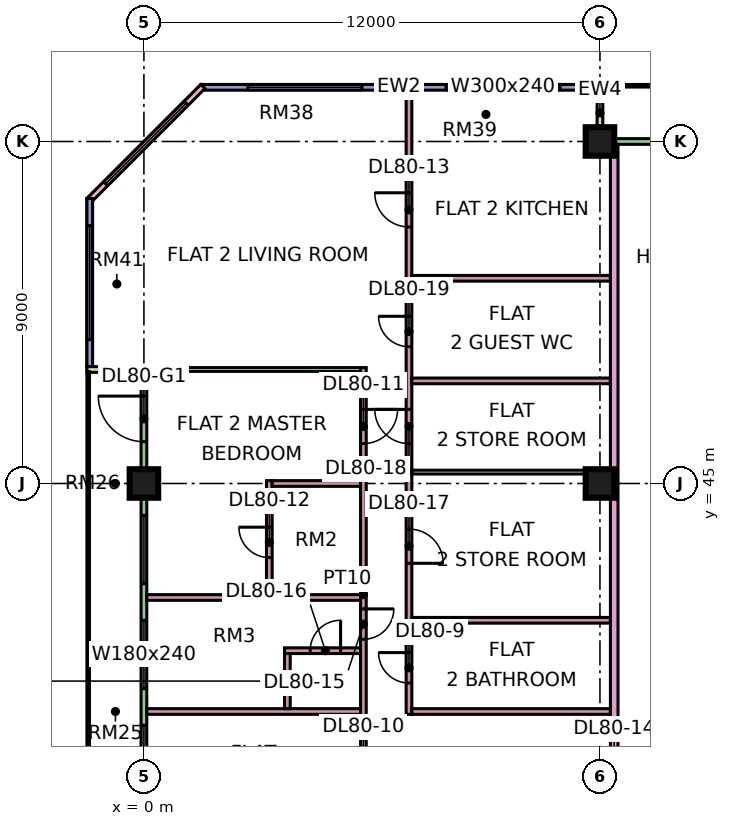
"""IFC4 building model, lengths in metres.
Left out: names, types, materials, properties, quantities, classifications, styles, units other than length and angle.
Written with IfcOpenShell. Run it as: python <this file> out.ifc"""

import sys

from ifc_helpers import new_model, si_unit, direction, frame, frame_2d, origin, origin_2d, place, context, subcontext, project, spatial, rectangle, extrude, element, fill, save


model = new_model("IFC4")
c1 = context("Model", 3, precision=1e-05, world=origin(), true_north=direction((0.0, 1.0)))
c2 = subcontext(c1, "Body", "Model", "MODEL_VIEW")
j1 = project(units=[si_unit("LENGTHUNIT", "METRE"), si_unit("PLANEANGLEUNIT", "RADIAN")], contexts=[c1])
p1 = place(None, origin())
s1 = spatial("IfcSite", under=j1, at=p1, CompositionType="ELEMENT")
p2 = place(p1, origin())
s2 = spatial("IfcBuilding", under=s1, at=p2, CompositionType="ELEMENT")
p3 = place(p2, frame((0.0, 0.0, 346.4)))
s3 = spatial("IfcBuildingStorey", under=s2, at=p3, CompositionType="ELEMENT", Elevation=346.4)
for number, where, z_axis, x_axis in (
    (1, (0.0, 45.0, 0.0), (0.0, 0.0, 1.0), (1.0, 0.0, 0.0)),
    (2, (12.0, 45.0, 0.0), (0.0, 0.0, 1.0), (1.0, 0.0, 0.0)),
    (3, (12.0, 54.0, 0.0), (0.0, 0.0, 1.0), (1.0, 0.0, 0.0)),
):
    element("IfcColumn", number, at=place(p3, frame(where, z_axis=z_axis, x_axis=x_axis)), inside=s3, PredefinedType="COLUMN", context=c2, shape_type="SweptSolid", body=[
        extrude(rectangle(XDim=0.75, YDim=0.75, at=origin_2d()), origin(), (0.0, 0.0, 1.0), 3.75),
    ])
p4 = place(p3, frame((22.425, 54.0, 0.0), z_axis=(0.0, 0.0, 1.0), x_axis=(-1.0, 0.0, 0.0)))
e4 = element("IfcWall", 4, at=p4, inside=s3, PredefinedType="SOLIDWALL", context=c2, shape_type="SweptSolid", body=[
    extrude(rectangle(XDim=10.35, YDim=0.15, at=frame_2d((5.175, 0.0))), origin(), (0.0, 0.0, 1.0), 3.35),
])
p5 = place(p4, frame((1.012, 0.0, 0.45)))
e5 = element("IfcOpeningElement", 5, at=p5, cuts=e4, PredefinedType="OPENING", context=c2, shape_type="SweptSolid", body=[
    extrude(rectangle(XDim=4.8, YDim=2.4, at=frame_2d((2.4, 1.2))), frame((0.0, 0.085, 0.0), z_axis=(0.0, -1.0, 0.0), x_axis=(1.0, 0.0, 0.0)), (0.0, 0.0, 1.0), 0.17),
])
p6 = place(p3, frame((12.0, 55.5, 0.0), z_axis=(0.0, 0.0, 1.0), x_axis=(0.0, -1.0, 0.0)))
e6 = element("IfcWall", 6, at=p6, inside=s3, PredefinedType="SOLIDWALL", context=c2, shape_type="SweptSolid", body=[
    extrude(rectangle(XDim=1.5, YDim=0.15, at=frame_2d((0.75, 0.0))), origin(), (0.0, 0.0, 1.0), 3.35),
])
p7 = place(p3, frame((11.925, 55.425, 0.0), z_axis=(0.0, 0.0, 1.0), x_axis=(-1.0, 0.0, 0.0)))
e7 = element("IfcWall", 7, at=p7, inside=s3, PredefinedType="SOLIDWALL", context=c2, shape_type="SweptSolid", body=[
    extrude(rectangle(XDim=10.425, YDim=0.15, at=frame_2d((5.212, 0.0))), origin(), (0.0, 0.0, 1.0), 3.35),
])
p8 = place(p7, frame((0.975, 0.0, 0.45)))
e8 = element("IfcOpeningElement", 8, at=p8, cuts=e7, PredefinedType="OPENING", context=c2, shape_type="SweptSolid", body=[
    extrude(rectangle(XDim=3.0, YDim=2.4, at=frame_2d((1.5, 1.2))), frame((0.0, 0.085, 0.0), z_axis=(0.0, -1.0, 0.0), x_axis=(1.0, 0.0, 0.0)), (0.0, 0.0, 1.0), 0.17),
])
p9 = place(p7, frame((6.188, 0.0, 0.45)))
e9 = element("IfcOpeningElement", 9, at=p9, cuts=e7, PredefinedType="OPENING", context=c2, shape_type="SweptSolid", body=[
    extrude(rectangle(XDim=3.0, YDim=2.4, at=frame_2d((1.5, 1.2))), frame((0.0, 0.085, 0.0), z_axis=(0.0, -1.0, 0.0), x_axis=(1.0, 0.0, 0.0)), (0.0, 0.0, 1.0), 0.17),
])
p10 = place(p3, frame((1.553, 55.447, 0.0), z_axis=(0.0, 0.0, 1.0), x_axis=(-0.707106781187, -0.707106781187, 0.0)))
e10 = element("IfcWall", 10, at=p10, inside=s3, PredefinedType="SOLIDWALL", context=c2, shape_type="SweptSolid", body=[
    extrude(rectangle(XDim=4.243, YDim=0.15, at=frame_2d((2.121, 0.0))), origin(), (0.0, 0.0, 1.0), 3.35),
])
p11 = place(p10, frame((0.621, 0.0, 0.45)))
e11 = element("IfcOpeningElement", 11, at=p11, cuts=e10, PredefinedType="OPENING", context=c2, shape_type="SweptSolid", body=[
    extrude(rectangle(XDim=3.0, YDim=2.4, at=frame_2d((1.5, 1.2))), frame((0.0, 0.085, 0.0), z_axis=(0.0, -1.0, 0.0), x_axis=(1.0, 0.0, 0.0)), (0.0, 0.0, 1.0), 0.17),
])
p12 = place(p3, frame((-1.425, 52.5, 0.0), z_axis=(0.0, 0.0, 1.0), x_axis=(0.0, -1.0, 0.0)))
e12 = element("IfcWall", 12, at=p12, inside=s3, PredefinedType="SOLIDWALL", context=c2, shape_type="SweptSolid", body=[
    extrude(rectangle(XDim=4.425, YDim=0.15, at=frame_2d((2.212, 0.0))), origin(), (0.0, 0.0, 1.0), 3.35),
])
p13 = place(p12, frame((0.712, 0.0, 0.45)))
e13 = element("IfcOpeningElement", 13, at=p13, cuts=e12, PredefinedType="OPENING", context=c2, shape_type="SweptSolid", body=[
    extrude(rectangle(XDim=3.0, YDim=2.4, at=frame_2d((1.5, 1.2))), frame((0.0, 0.085, 0.0), z_axis=(0.0, -1.0, 0.0), x_axis=(1.0, 0.0, 0.0)), (0.0, 0.0, 1.0), 0.17),
])
p14 = place(p3, frame((0.0, 47.925, 0.0), z_axis=(0.0, 0.0, 1.0), x_axis=(0.0, -1.0, 0.0)))
e14 = element("IfcWall", 14, at=p14, inside=s3, PredefinedType="SOLIDWALL", context=c2, shape_type="SweptSolid", body=[
    extrude(rectangle(XDim=11.85, YDim=0.15, at=frame_2d((5.925, 0.0))), origin(), (0.0, 0.0, 1.0), 3.35),
])
p15 = place(p14, frame((0.625, 0.0, 0.0)))
e15 = element("IfcOpeningElement", 15, at=p15, cuts=e14, PredefinedType="OPENING", context=c2, shape_type="SweptSolid", body=[
    extrude(rectangle(XDim=1.2, YDim=2.4, at=frame_2d((0.6, 1.2))), frame((0.0, 0.085, 0.0), z_axis=(0.0, -1.0, 0.0), x_axis=(1.0, 0.0, 0.0)), (0.0, 0.0, 1.0), 0.17),
])
p16 = place(p14, frame((3.762, 0.0, 0.45)))
e16 = element("IfcOpeningElement", 16, at=p16, cuts=e14, PredefinedType="OPENING", context=c2, shape_type="SweptSolid", body=[
    extrude(rectangle(XDim=1.8, YDim=2.4, at=frame_2d((0.9, 1.2))), frame((0.0, 0.085, 0.0), z_axis=(0.0, -1.0, 0.0), x_axis=(1.0, 0.0, 0.0)), (0.0, 0.0, 1.0), 0.17),
])
p17 = place(p14, frame((6.525, 0.0, 0.45)))
e17 = element("IfcOpeningElement", 17, at=p17, cuts=e14, PredefinedType="OPENING", context=c2, shape_type="SweptSolid", body=[
    extrude(rectangle(XDim=1.8, YDim=2.4, at=frame_2d((0.9, 1.2))), frame((0.0, 0.085, 0.0), z_axis=(0.0, -1.0, 0.0), x_axis=(1.0, 0.0, 0.0)), (0.0, 0.0, 1.0), 0.17),
])
p18 = place(p14, frame((9.288, 0.0, 0.45)))
e18 = element("IfcOpeningElement", 18, at=p18, cuts=e14, PredefinedType="OPENING", context=c2, shape_type="SweptSolid", body=[
    extrude(rectangle(XDim=1.8, YDim=2.4, at=frame_2d((0.9, 1.2))), frame((0.0, 0.085, 0.0), z_axis=(0.0, -1.0, 0.0), x_axis=(1.0, 0.0, 0.0)), (0.0, 0.0, 1.0), 0.17),
])
p19 = place(p3, frame((-1.5, 48.0, 0.0), z_axis=(0.0, 0.0, 1.0), x_axis=(1.0, 0.0, 0.0)))
e19 = element("IfcWall", 19, at=p19, inside=s3, PredefinedType="SOLIDWALL", context=c2, shape_type="SweptSolid", body=[
    extrude(rectangle(XDim=1.5, YDim=0.15, at=frame_2d((0.75, 0.0))), origin(), (0.0, 0.0, 1.0), 3.35),
])
p20 = place(p3, frame((0.0, 48.0, 0.0), z_axis=(0.0, 0.0, 1.0), x_axis=(1.0, 0.0, 0.0)))
e20 = element("IfcWall", 20, at=p20, inside=s3, PredefinedType="PARTITIONING", context=c2, shape_type="SweptSolid", body=[
    extrude(rectangle(XDim=5.7, YDim=0.1, at=frame_2d((2.85, 0.0))), origin(), (0.0, 0.0, 1.0), 3.35),
])
for number, where, z_axis, x_axis in (
    (21, (0.074, 39.0, 0.0), (0.0, 0.0, 1.0), (1.0, 0.0, 0.0)),
    (22, (0.074, 42.0, 0.0), (0.0, 0.0, 1.0), (1.0, 0.0, 0.0)),
):
    element("IfcWall", number, at=place(p3, frame(where, z_axis=z_axis, x_axis=x_axis)), inside=s3, PredefinedType="PARTITIONING", context=c2, shape_type="SweptSolid", body=[
        extrude(rectangle(XDim=5.626, YDim=0.15, at=frame_2d((2.813, 0.0))), origin(), (0.0, 0.0, 1.0), 3.35),
    ])
p21 = place(p3, frame((3.3, 42.075, 0.0), z_axis=(0.0, 0.0, 1.0), x_axis=(0.0, 1.0, 0.0)))
e23 = element("IfcWall", 23, at=p21, inside=s3, PredefinedType="PARTITIONING", context=c2, shape_type="SweptSolid", body=[
    extrude(rectangle(XDim=3.0, YDim=0.15, at=frame_2d((1.5, 0.0))), origin(), (0.0, 0.0, 1.0), 3.35),
])
p22 = place(p21, frame((0.975, 0.0, 0.0)))
e24 = element("IfcOpeningElement", 24, at=p22, cuts=e23, PredefinedType="OPENING", context=c2, shape_type="SweptSolid", body=[
    extrude(rectangle(XDim=0.8, YDim=2.1, at=frame_2d((0.4, 1.05))), frame((0.0, 0.085, 0.0), z_axis=(0.0, -1.0, 0.0), x_axis=(1.0, 0.0, 0.0)), (0.0, 0.0, 1.0), 0.17),
])
p23 = place(p3, frame((3.375, 45.0, 0.0), z_axis=(0.0, 0.0, 1.0), x_axis=(1.0, 0.0, 0.0)))
e25 = element("IfcWall", 25, at=p23, inside=s3, PredefinedType="PARTITIONING", context=c2, shape_type="SweptSolid", body=[
    extrude(rectangle(XDim=2.325, YDim=0.15, at=frame_2d((1.163, 0.0))), origin(), (0.0, 0.0, 1.0), 3.35),
])
p24 = place(p3, frame((3.7, 40.6, 0.0), z_axis=(0.0, 0.0, 1.0), x_axis=(1.0, 0.0, 0.0)))
e26 = element("IfcWall", 26, at=p24, inside=s3, PredefinedType="PARTITIONING", context=c2, shape_type="SweptSolid", body=[
    extrude(rectangle(XDim=2.0, YDim=0.15, at=frame_2d((1.0, 0.0))), origin(), (0.0, 0.0, 1.0), 3.35),
])
p25 = place(p24, frame((0.675, 0.0, 0.0)))
e27 = element("IfcOpeningElement", 27, at=p25, cuts=e26, PredefinedType="OPENING", context=c2, shape_type="SweptSolid", body=[
    extrude(rectangle(XDim=0.8, YDim=2.1, at=frame_2d((0.4, 1.05))), frame((0.0, 0.085, 0.0), z_axis=(0.0, -1.0, 0.0), x_axis=(1.0, 0.0, 0.0)), (0.0, 0.0, 1.0), 0.17),
])
p26 = place(p3, frame((3.775, 39.075, 0.0), z_axis=(0.0, 0.0, 1.0), x_axis=(0.0, 1.0, 0.0)))
e28 = element("IfcWall", 28, at=p26, inside=s3, PredefinedType="PARTITIONING", context=c2, shape_type="SweptSolid", body=[
    extrude(rectangle(XDim=1.45, YDim=0.15, at=frame_2d((0.725, 0.0))), origin(), (0.0, 0.0, 1.0), 3.35),
])
p27 = place(p3, frame((5.775, 36.1, 0.0), z_axis=(0.0, 0.0, 1.0), x_axis=(0.0, 1.0, 0.0)))
e29 = element("IfcWall", 29, at=p27, inside=s3, PredefinedType="PARTITIONING", context=c2, shape_type="SweptSolid", body=[
    extrude(rectangle(XDim=11.95, YDim=0.15, at=frame_2d((5.975, 0.0))), origin(), (0.0, 0.0, 1.0), 3.35),
])
p28 = place(p27, frame((0.95, 0.0, 0.0)))
e30 = element("IfcOpeningElement", 30, at=p28, cuts=e29, PredefinedType="OPENING", context=c2, shape_type="SweptSolid", body=[
    extrude(rectangle(XDim=0.9, YDim=2.1, at=frame_2d((0.45, 1.05))), frame((0.0, 0.085, 0.0), z_axis=(0.0, -1.0, 0.0), x_axis=(1.0, 0.0, 0.0)), (0.0, 0.0, 1.0), 0.17),
])
p29 = place(p27, frame((9.95, 0.0, 0.0)))
e31 = element("IfcOpeningElement", 31, at=p29, cuts=e29, PredefinedType="OPENING", context=c2, shape_type="SweptSolid", body=[
    extrude(rectangle(XDim=0.9, YDim=2.1, at=frame_2d((0.45, 1.05))), frame((0.0, 0.085, 0.0), z_axis=(0.0, -1.0, 0.0), x_axis=(1.0, 0.0, 0.0)), (0.0, 0.0, 1.0), 0.17),
])
p30 = place(p27, frame((4.8, 0.0, 0.0)))
e32 = element("IfcOpeningElement", 32, at=p30, cuts=e29, PredefinedType="OPENING", context=c2, shape_type="SweptSolid", body=[
    extrude(rectangle(XDim=0.8, YDim=2.1, at=frame_2d((0.4, 1.05))), frame((0.0, 0.085, 0.0), z_axis=(0.0, -1.0, 0.0), x_axis=(1.0, 0.0, 0.0)), (0.0, 0.0, 1.0), 0.17),
])
p31 = place(p3, frame((6.975, 38.925, 0.0), z_axis=(0.0, 0.0, 1.0), x_axis=(0.0, 1.0, 0.0)))
e33 = element("IfcWall", 33, at=p31, inside=s3, PredefinedType="PARTITIONING", context=c2, shape_type="SweptSolid", body=[
    extrude(rectangle(XDim=16.425, YDim=0.15, at=frame_2d((8.212, 0.0))), origin(), (0.0, 0.0, 1.0), 3.35),
])
p32 = place(p31, frame((0.825, 0.0, 0.0)))
e34 = element("IfcOpeningElement", 34, at=p32, cuts=e33, PredefinedType="OPENING", context=c2, shape_type="SweptSolid", body=[
    extrude(rectangle(XDim=0.8, YDim=2.1, at=frame_2d((0.4, 1.05))), frame((0.0, 0.085, 0.0), z_axis=(0.0, -1.0, 0.0), x_axis=(1.0, 0.0, 0.0)), (0.0, 0.0, 1.0), 0.17),
])
p33 = place(p31, frame((12.825, 0.0, 0.0)))
e35 = element("IfcOpeningElement", 35, at=p33, cuts=e33, PredefinedType="OPENING", context=c2, shape_type="SweptSolid", body=[
    extrude(rectangle(XDim=0.9, YDim=2.1, at=frame_2d((0.45, 1.05))), frame((0.0, 0.085, 0.0), z_axis=(0.0, -1.0, 0.0), x_axis=(1.0, 0.0, 0.0)), (0.0, 0.0, 1.0), 0.17),
])
p34 = place(p31, frame((3.975, 0.0, 0.0)))
e36 = element("IfcOpeningElement", 36, at=p34, cuts=e33, PredefinedType="OPENING", context=c2, shape_type="SweptSolid", body=[
    extrude(rectangle(XDim=0.9, YDim=2.1, at=frame_2d((0.45, 1.05))), frame((0.0, 0.085, 0.0), z_axis=(0.0, -1.0, 0.0), x_axis=(1.0, 0.0, 0.0)), (0.0, 0.0, 1.0), 0.17),
])
p35 = place(p31, frame((7.125, 0.0, 0.0)))
e37 = element("IfcOpeningElement", 37, at=p35, cuts=e33, PredefinedType="OPENING", context=c2, shape_type="SweptSolid", body=[
    extrude(rectangle(XDim=0.9, YDim=2.1, at=frame_2d((0.45, 1.05))), frame((0.0, 0.085, 0.0), z_axis=(0.0, -1.0, 0.0), x_axis=(1.0, 0.0, 0.0)), (0.0, 0.0, 1.0), 0.17),
])
p36 = place(p31, frame((9.675, 0.0, 0.0)))
e38 = element("IfcOpeningElement", 38, at=p36, cuts=e33, PredefinedType="OPENING", context=c2, shape_type="SweptSolid", body=[
    extrude(rectangle(XDim=0.8, YDim=2.1, at=frame_2d((0.4, 1.05))), frame((0.0, 0.085, 0.0), z_axis=(0.0, -1.0, 0.0), x_axis=(1.0, 0.0, 0.0)), (0.0, 0.0, 1.0), 0.17),
])
for number, where, z_axis, x_axis in (
    (39, (7.05, 39.0, 0.0), (0.0, 0.0, 1.0), (1.0, 0.0, 0.0)),
    (40, (7.05, 41.4, 0.0), (0.0, 0.0, 1.0), (1.0, 0.0, 0.0)),
):
    element("IfcWall", number, at=place(p3, frame(where, z_axis=z_axis, x_axis=x_axis)), inside=s3, PredefinedType="PARTITIONING", context=c2, shape_type="SweptSolid", body=[
        extrude(rectangle(XDim=5.225, YDim=0.15, at=frame_2d((2.612, 0.0))), origin(), (0.0, 0.0, 1.0), 3.35),
    ])
p37 = place(p3, frame((7.05, 45.3, 0.0), z_axis=(0.0, 0.0, 1.0), x_axis=(1.0, 0.0, 0.0)))
e41 = element("IfcWall", 41, at=p37, inside=s3, PredefinedType="PARTITIONING", context=c2, shape_type="SweptSolid", body=[
    extrude(rectangle(XDim=5.225, YDim=0.1, at=frame_2d((2.612, 0.0))), origin(), (0.0, 0.0, 1.0), 3.35),
])
for number, where, z_axis, x_axis in (
    (42, (7.05, 47.7, 0.0), (0.0, 0.0, 1.0), (1.0, 0.0, 0.0)),
    (43, (7.05, 50.4, 0.0), (0.0, 0.0, 1.0), (1.0, 0.0, 0.0)),
):
    element("IfcWall", number, at=place(p3, frame(where, z_axis=z_axis, x_axis=x_axis)), inside=s3, PredefinedType="PARTITIONING", context=c2, shape_type="SweptSolid", body=[
        extrude(rectangle(XDim=5.225, YDim=0.15, at=frame_2d((2.612, 0.0))), origin(), (0.0, 0.0, 1.0), 3.35),
    ])
p38 = place(p3, frame((12.375, 20.0, 0.0), z_axis=(0.0, 0.0, 1.0), x_axis=(0.0, 1.0, 0.0)))
e44 = element("IfcWall", 44, at=p38, inside=s3, PredefinedType="PARTITIONING", context=c2, shape_type="SweptSolid", body=[
    extrude(rectangle(XDim=33.926, YDim=0.2, at=frame_2d((16.963, 0.0))), origin(), (0.0, 0.0, 1.0), 3.35),
])
p39 = place(p38, frame((16.95, 0.0, 0.0)))
e45 = element("IfcOpeningElement", 45, at=p39, cuts=e44, PredefinedType="OPENING", context=c2, shape_type="SweptSolid", body=[
    extrude(rectangle(XDim=1.0, YDim=2.1, at=frame_2d((0.5, 1.05))), frame((0.0, 0.11, 0.0), z_axis=(0.0, -1.0, 0.0), x_axis=(1.0, 0.0, 0.0)), (0.0, 0.0, 1.0), 0.22),
])
p40 = place(p38, frame((0.6, 0.0, 0.0)))
e46 = element("IfcOpeningElement", 46, at=p40, cuts=e44, PredefinedType="OPENING", context=c2, shape_type="SweptSolid", body=[
    extrude(rectangle(XDim=1.2, YDim=2.1, at=frame_2d((0.6, 1.05))), frame((0.0, 0.11, 0.0), z_axis=(0.0, -1.0, 0.0), x_axis=(1.0, 0.0, 0.0)), (0.0, 0.0, 1.0), 0.22),
])
p41 = place(p38, frame((14.25, 0.0, 0.0)))
e47 = element("IfcOpeningElement", 47, at=p41, cuts=e44, PredefinedType="OPENING", context=c2, shape_type="SweptSolid", body=[
    extrude(rectangle(XDim=1.0, YDim=2.1, at=frame_2d((0.5, 1.05))), frame((0.0, 0.11, 0.0), z_axis=(0.0, -1.0, 0.0), x_axis=(1.0, 0.0, 0.0)), (0.0, 0.0, 1.0), 0.22),
])
p42 = place(p8, origin())
e48 = element("IfcWindow", 48, at=p42, inside=s3, PartitioningType="SINGLE_PANEL", PredefinedType="WINDOW", context=c2, shape_type="SweptSolid", body=[
    extrude(rectangle(XDim=3.0, YDim=2.4, at=frame_2d((1.5, 1.2))), frame((0.0, 0.03, 0.0), z_axis=(0.0, -1.0, 0.0), x_axis=(1.0, 0.0, 0.0)), (0.0, 0.0, 1.0), 0.06),
])
fill(e8, e48)
p43 = place(p9, origin())
e49 = element("IfcWindow", 49, at=p43, inside=s3, PartitioningType="SINGLE_PANEL", PredefinedType="WINDOW", context=c2, shape_type="SweptSolid", body=[
    extrude(rectangle(XDim=3.0, YDim=2.4, at=frame_2d((1.5, 1.2))), frame((0.0, 0.03, 0.0), z_axis=(0.0, -1.0, 0.0), x_axis=(1.0, 0.0, 0.0)), (0.0, 0.0, 1.0), 0.06),
])
fill(e9, e49)
p44 = place(p11, origin())
e50 = element("IfcWindow", 50, at=p44, inside=s3, PartitioningType="SINGLE_PANEL", PredefinedType="WINDOW", context=c2, shape_type="SweptSolid", body=[
    extrude(rectangle(XDim=3.0, YDim=2.4, at=frame_2d((1.5, 1.2))), frame((0.0, 0.03, 0.0), z_axis=(0.0, -1.0, 0.0), x_axis=(1.0, 0.0, 0.0)), (0.0, 0.0, 1.0), 0.06),
])
fill(e11, e50)
p45 = place(p13, origin())
e51 = element("IfcWindow", 51, at=p45, inside=s3, PartitioningType="SINGLE_PANEL", PredefinedType="WINDOW", context=c2, shape_type="SweptSolid", body=[
    extrude(rectangle(XDim=3.0, YDim=2.4, at=frame_2d((1.5, 1.2))), frame((0.0, 0.03, 0.0), z_axis=(0.0, -1.0, 0.0), x_axis=(1.0, 0.0, 0.0)), (0.0, 0.0, 1.0), 0.06),
])
fill(e13, e51)
p46 = place(p15, frame((1.2, 0.0, 0.0), z_axis=(0.0, 0.0, 1.0), x_axis=(-1.0, 0.0, 0.0)))
e52 = element("IfcDoor", 52, at=p46, inside=s3, OperationType="DOUBLE_DOOR_SINGLE_SWING", PredefinedType="DOOR", context=c2, shape_type="SweptSolid", body=[
    extrude(rectangle(XDim=1.2, YDim=2.4, at=frame_2d((0.6, 1.2))), frame((0.0, 0.025, 0.0), z_axis=(0.0, -1.0, 0.0), x_axis=(1.0, 0.0, 0.0)), (0.0, 0.0, 1.0), 0.05),
])
fill(e15, e52)
p47 = place(p16, origin())
e53 = element("IfcWindow", 53, at=p47, inside=s3, PartitioningType="SINGLE_PANEL", PredefinedType="WINDOW", context=c2, shape_type="SweptSolid", body=[
    extrude(rectangle(XDim=1.8, YDim=2.4, at=frame_2d((0.9, 1.2))), frame((0.0, 0.03, 0.0), z_axis=(0.0, -1.0, 0.0), x_axis=(1.0, 0.0, 0.0)), (0.0, 0.0, 1.0), 0.06),
])
fill(e16, e53)
p48 = place(p17, origin())
e54 = element("IfcWindow", 54, at=p48, inside=s3, PartitioningType="SINGLE_PANEL", PredefinedType="WINDOW", context=c2, shape_type="SweptSolid", body=[
    extrude(rectangle(XDim=1.8, YDim=2.4, at=frame_2d((0.9, 1.2))), frame((0.0, 0.03, 0.0), z_axis=(0.0, -1.0, 0.0), x_axis=(1.0, 0.0, 0.0)), (0.0, 0.0, 1.0), 0.06),
])
fill(e17, e54)
p49 = place(p18, origin())
e55 = element("IfcWindow", 55, at=p49, inside=s3, PartitioningType="SINGLE_PANEL", PredefinedType="WINDOW", context=c2, shape_type="SweptSolid", body=[
    extrude(rectangle(XDim=1.8, YDim=2.4, at=frame_2d((0.9, 1.2))), frame((0.0, 0.03, 0.0), z_axis=(0.0, -1.0, 0.0), x_axis=(1.0, 0.0, 0.0)), (0.0, 0.0, 1.0), 0.06),
])
fill(e18, e55)
p50 = place(p32, frame((0.8, 0.0, 0.0), z_axis=(0.0, 0.0, 1.0), x_axis=(-1.0, 0.0, 0.0)))
e56 = element("IfcDoor", 56, at=p50, inside=s3, OperationType="SINGLE_SWING_RIGHT", PredefinedType="DOOR", context=c2, shape_type="SweptSolid", body=[
    extrude(rectangle(XDim=0.8, YDim=2.1, at=frame_2d((0.4, 1.05))), frame((0.0, 0.025, 0.0), z_axis=(0.0, -1.0, 0.0), x_axis=(1.0, 0.0, 0.0)), (0.0, 0.0, 1.0), 0.05),
])
fill(e34, e56)
p51 = place(p29, origin())
e57 = element("IfcDoor", 57, at=p51, inside=s3, OperationType="SINGLE_SWING_RIGHT", PredefinedType="DOOR", context=c2, shape_type="SweptSolid", body=[
    extrude(rectangle(XDim=0.9, YDim=2.1, at=frame_2d((0.45, 1.05))), frame((0.0, 0.025, 0.0), z_axis=(0.0, -1.0, 0.0), x_axis=(1.0, 0.0, 0.0)), (0.0, 0.0, 1.0), 0.05),
])
fill(e31, e57)
p52 = place(p22, frame((0.8, 0.0, 0.0), z_axis=(0.0, 0.0, 1.0), x_axis=(-1.0, 0.0, 0.0)))
e58 = element("IfcDoor", 58, at=p52, inside=s3, OperationType="SINGLE_SWING_RIGHT", PredefinedType="DOOR", context=c2, shape_type="SweptSolid", body=[
    extrude(rectangle(XDim=0.8, YDim=2.1, at=frame_2d((0.4, 1.05))), frame((0.0, 0.025, 0.0), z_axis=(0.0, -1.0, 0.0), x_axis=(1.0, 0.0, 0.0)), (0.0, 0.0, 1.0), 0.05),
])
fill(e24, e58)
p53 = place(p33, frame((0.9, 0.0, 0.0), z_axis=(0.0, 0.0, 1.0), x_axis=(-1.0, 0.0, 0.0)))
e59 = element("IfcDoor", 59, at=p53, inside=s3, OperationType="SINGLE_SWING_RIGHT", PredefinedType="DOOR", context=c2, shape_type="SweptSolid", body=[
    extrude(rectangle(XDim=0.9, YDim=2.1, at=frame_2d((0.45, 1.05))), frame((0.0, 0.025, 0.0), z_axis=(0.0, -1.0, 0.0), x_axis=(1.0, 0.0, 0.0)), (0.0, 0.0, 1.0), 0.05),
])
fill(e35, e59)
p54 = place(p30, origin())
e60 = element("IfcDoor", 60, at=p54, inside=s3, OperationType="SINGLE_SWING_RIGHT", PredefinedType="DOOR", context=c2, shape_type="SweptSolid", body=[
    extrude(rectangle(XDim=0.8, YDim=2.1, at=frame_2d((0.4, 1.05))), frame((0.0, 0.025, 0.0), z_axis=(0.0, -1.0, 0.0), x_axis=(1.0, 0.0, 0.0)), (0.0, 0.0, 1.0), 0.05),
])
fill(e32, e60)
p55 = place(p25, frame((0.8, 0.0, 0.0), z_axis=(0.0, 0.0, 1.0), x_axis=(-1.0, 0.0, 0.0)))
e61 = element("IfcDoor", 61, at=p55, inside=s3, OperationType="SINGLE_SWING_RIGHT", PredefinedType="DOOR", context=c2, shape_type="SweptSolid", body=[
    extrude(rectangle(XDim=0.8, YDim=2.1, at=frame_2d((0.4, 1.05))), frame((0.0, 0.025, 0.0), z_axis=(0.0, -1.0, 0.0), x_axis=(1.0, 0.0, 0.0)), (0.0, 0.0, 1.0), 0.05),
])
fill(e27, e61)
p56 = place(p34, frame((0.9, 0.0, 0.0), z_axis=(0.0, 0.0, 1.0), x_axis=(-1.0, 0.0, 0.0)))
e62 = element("IfcDoor", 62, at=p56, inside=s3, OperationType="SINGLE_SWING_LEFT", PredefinedType="DOOR", context=c2, shape_type="SweptSolid", body=[
    extrude(rectangle(XDim=0.9, YDim=2.1, at=frame_2d((0.45, 1.05))), frame((0.0, 0.025, 0.0), z_axis=(0.0, -1.0, 0.0), x_axis=(1.0, 0.0, 0.0)), (0.0, 0.0, 1.0), 0.05),
])
fill(e36, e62)
p57 = place(p35, frame((0.9, 0.0, 0.0), z_axis=(0.0, 0.0, 1.0), x_axis=(-1.0, 0.0, 0.0)))
e63 = element("IfcDoor", 63, at=p57, inside=s3, OperationType="SINGLE_SWING_RIGHT", PredefinedType="DOOR", context=c2, shape_type="SweptSolid", body=[
    extrude(rectangle(XDim=0.9, YDim=2.1, at=frame_2d((0.45, 1.05))), frame((0.0, 0.025, 0.0), z_axis=(0.0, -1.0, 0.0), x_axis=(1.0, 0.0, 0.0)), (0.0, 0.0, 1.0), 0.05),
])
fill(e37, e63)
p58 = place(p36, frame((0.8, 0.0, 0.0), z_axis=(0.0, 0.0, 1.0), x_axis=(-1.0, 0.0, 0.0)))
e64 = element("IfcDoor", 64, at=p58, inside=s3, OperationType="SINGLE_SWING_RIGHT", PredefinedType="DOOR", context=c2, shape_type="SweptSolid", body=[
    extrude(rectangle(XDim=0.8, YDim=2.1, at=frame_2d((0.4, 1.05))), frame((0.0, 0.025, 0.0), z_axis=(0.0, -1.0, 0.0), x_axis=(1.0, 0.0, 0.0)), (0.0, 0.0, 1.0), 0.05),
])
fill(e38, e64)
save(model, sys.argv[1])
